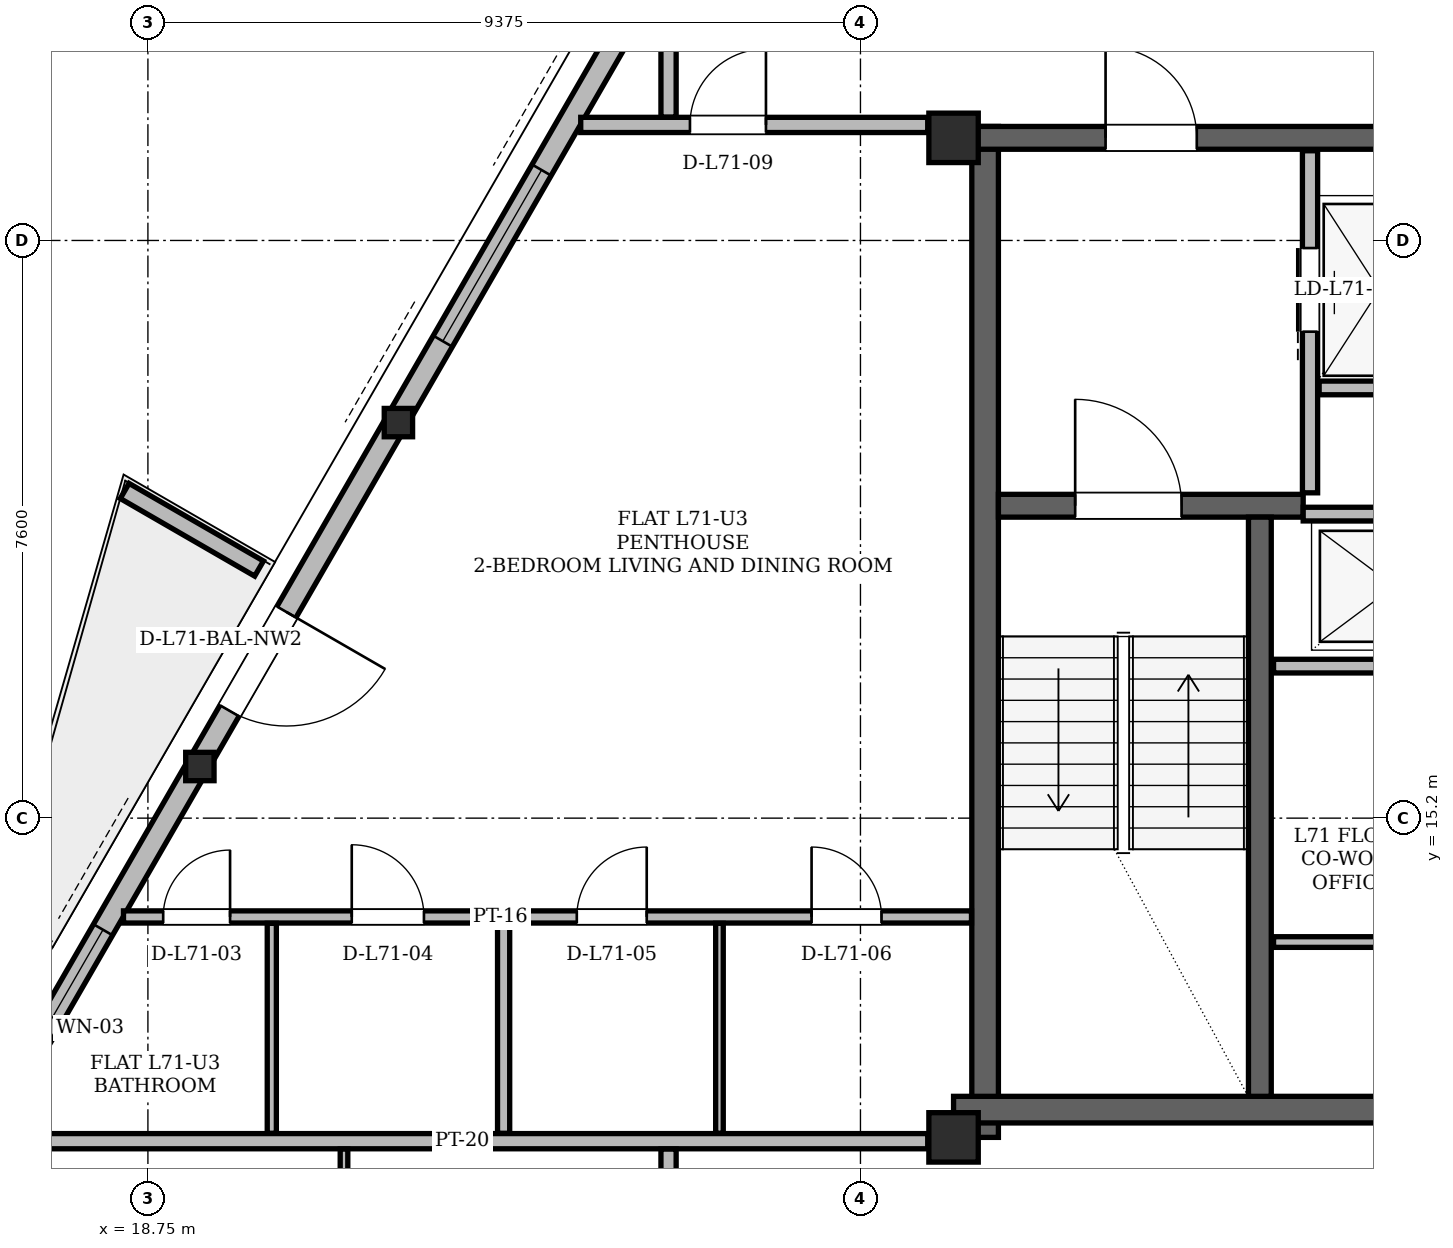
"""IFC4 building model, lengths in metres.
Left out: names, types, materials, properties, quantities, classifications, styles, units other than length and angle.
Written with IfcOpenShell. Run it as: python <this file> out.ifc"""

import sys

from ifc_helpers import new_model, si_unit, direction, frame, frame_2d, origin, origin_2d, place, context, subcontext, project, spatial, polyline, rectangle, hollow_rectangle, i_section, outline, extrude, element, fill, save


model = new_model("IFC4")
c1 = context("Model", 3, precision=1e-05, world=origin(), true_north=direction((0.0, 1.0)))
c2 = subcontext(c1, "Body", "Model", "MODEL_VIEW")
j1 = project(units=[si_unit("LENGTHUNIT", "METRE"), si_unit("PLANEANGLEUNIT", "RADIAN")], contexts=[c1])
p1 = place(None, origin())
s1 = spatial("IfcSite", under=j1, at=p1, CompositionType="ELEMENT")
p2 = place(p1, origin())
s2 = spatial("IfcBuilding", under=s1, at=p2, CompositionType="ELEMENT")
p3 = place(p2, frame((0.0, 0.0, 269.4)))
s3 = spatial("IfcBuildingStorey", under=s2, at=p3, CompositionType="ELEMENT", Elevation=269.4)
for number, where, z_axis, x_axis in (
    (1, (29.35, 11.0, 0.0), (0.0, 0.0, 1.0), (1.0, 0.0, 0.0)),
    (2, (29.35, 24.15, 0.0), (0.0, 0.0, 1.0), (1.0, 0.0, 0.0)),
):
    element("IfcColumn", number, at=place(p3, frame(where, z_axis=z_axis, x_axis=x_axis)), inside=s3, PredefinedType="COLUMN", context=c2, shape_type="SweptSolid", body=[
        extrude(hollow_rectangle(XDim=0.65, YDim=0.65, WallThickness=0.05, at=origin_2d()), origin(), (0.0, 0.0, 1.0), 3.9),
    ])
for number, where, z_axis, x_axis in (
    (3, (22.023, 20.423, 0.005), (0.012, -0.01, 1.0), (0.63, 0.776, 0.0)),
    (4, (19.412, 15.901, 0.005), (0.011, -0.011, 1.0), (0.707, 0.707, 0.0)),
):
    element("IfcColumn", number, at=place(p3, frame(where, z_axis=z_axis, x_axis=x_axis)), inside=s3, PredefinedType="COLUMN", context=c2, shape_type="SweptSolid", body=[
        extrude(i_section(OverallWidth=0.373, OverallDepth=0.373, WebThickness=0.016, FlangeThickness=0.026, at=origin_2d()), origin(), (0.0, 0.0, 1.0), 3.891),
    ])
p4 = place(p3, frame((29.765, 11.0, 0.0), z_axis=(0.0, 0.0, 1.0), x_axis=(0.0, 1.0, 0.0)))
e5 = element("IfcWall", 5, at=p4, inside=s3, PredefinedType="SHEAR", context=c2, shape_type="SweptSolid", body=[
    extrude(rectangle(XDim=13.3, YDim=0.35, at=frame_2d((6.65, 0.0))), origin(), (0.0, 0.0, 1.0), 3.68),
])
p5 = place(p3, frame((29.35, 11.365, 0.0), z_axis=(0.0, 0.0, 1.0), x_axis=(1.0, 0.0, 0.0)))
e6 = element("IfcWall", 6, at=p5, inside=s3, PredefinedType="SHEAR", context=c2, shape_type="SweptSolid", body=[
    extrude(rectangle(XDim=7.1, YDim=0.35, at=frame_2d((3.55, 0.0))), origin(), (0.0, 0.0, 1.0), 3.68),
])
p6 = place(p3, frame((29.65, 24.15, 0.0), z_axis=(0.0, 0.0, 1.0), x_axis=(1.0, 0.0, 0.0)))
e7 = element("IfcWall", 7, at=p6, inside=s3, PredefinedType="SHEAR", context=c2, shape_type="SweptSolid", body=[
    extrude(rectangle(XDim=15.7, YDim=0.3, at=frame_2d((7.85, 0.0))), origin(), (0.0, 0.0, 1.0), 3.68),
])
p7 = place(p6, frame((1.7, 0.0, 0.0)))
e8 = element("IfcOpeningElement", 8, at=p7, cuts=e7, PredefinedType="OPENING", context=c2, shape_type="SweptSolid", body=[
    extrude(rectangle(XDim=1.2, YDim=2.2, at=frame_2d((0.6, 1.1))), frame((0.0, 0.15, 0.0), z_axis=(0.0, -1.0, 0.0), x_axis=(1.0, 0.0, 0.0)), (0.0, 0.0, 1.0), 0.3),
])
p8 = place(p6, frame((12.8, 0.0, 0.0)))
e9 = element("IfcOpeningElement", 9, at=p8, cuts=e7, PredefinedType="OPENING", context=c2, shape_type="SweptSolid", body=[
    extrude(rectangle(XDim=1.2, YDim=2.2, at=frame_2d((0.6, 1.1))), frame((0.0, 0.15, 0.0), z_axis=(0.0, -1.0, 0.0), x_axis=(1.0, 0.0, 0.0)), (0.0, 0.0, 1.0), 0.3),
])
p9 = place(p6, frame((7.4, 0.0, 0.0)))
e10 = element("IfcOpeningElement", 10, at=p9, cuts=e7, PredefinedType="OPENING", context=c2, shape_type="SweptSolid", body=[
    extrude(rectangle(XDim=0.9, YDim=2.05, at=frame_2d((0.45, 1.025))), frame((0.0, 0.15, 0.0), z_axis=(0.0, -1.0, 0.0), x_axis=(1.0, 0.0, 0.0)), (0.0, 0.0, 1.0), 0.3),
])
p10 = place(p3, frame((29.94, 19.31, 0.0), z_axis=(0.0, 0.0, 1.0), x_axis=(1.0, 0.0, 0.0)))
e11 = element("IfcWall", 11, at=p10, inside=s3, PredefinedType="SHEAR", context=c2, shape_type="SweptSolid", body=[
    extrude(rectangle(XDim=4.01, YDim=0.3, at=frame_2d((2.005, 0.0))), origin(), (0.0, 0.0, 1.0), 3.68),
])
p11 = place(p10, frame((1.01, 0.0, 0.0)))
e12 = element("IfcOpeningElement", 12, at=p11, cuts=e11, PredefinedType="OPENING", context=c2, shape_type="SweptSolid", body=[
    extrude(rectangle(XDim=1.4, YDim=2.2, at=frame_2d((0.7, 1.1))), frame((0.0, 0.15, 0.0), z_axis=(0.0, -1.0, 0.0), x_axis=(1.0, 0.0, 0.0)), (0.0, 0.0, 1.0), 0.3),
])
p12 = place(p3, frame((33.38, 11.54, 0.0), z_axis=(0.0, 0.0, 1.0), x_axis=(0.0, 1.0, 0.0)))
e13 = element("IfcWall", 13, at=p12, inside=s3, PredefinedType="SHEAR", context=c2, shape_type="SweptSolid", body=[
    extrude(rectangle(XDim=7.62, YDim=0.3, at=frame_2d((3.81, 0.0))), origin(), (0.0, 0.0, 1.0), 3.68),
])
p13 = place(p3, frame((16.428, 10.733, 0.0), z_axis=(0.0, 0.0, 1.0), x_axis=(0.499973841066, -0.866040506125, 0.0)))
e14 = element("IfcWall", 14, at=p13, inside=s3, PredefinedType="SOLIDWALL", context=c2, shape_type="SweptSolid", body=[
    extrude(rectangle(XDim=4.848, YDim=0.29, at=frame_2d((2.424, 0.0))), origin(), (0.0, 0.0, 1.0), 3.058),
])
p14 = place(p3, frame((35.076, 43.032, 0.0), z_axis=(0.0, 0.0, 1.0), x_axis=(-0.500001430823, -0.866024577697, 0.0)))
e15 = element("IfcWall", 15, at=p14, inside=s3, PredefinedType="SOLIDWALL", context=c2, shape_type="SweptSolid", body=[
    extrude(rectangle(XDim=37.296, YDim=0.29, at=frame_2d((18.648, 0.0))), origin(), (0.0, 0.0, 1.0), 3.058),
])
p15 = place(p14, frame((8.244, 0.0, 0.0)))
e16 = element("IfcOpeningElement", 16, at=p15, cuts=e15, PredefinedType="OPENING", context=c2, shape_type="SweptSolid", body=[
    extrude(rectangle(XDim=1.5, YDim=2.2, at=frame_2d((0.75, 1.1))), frame((0.0, 0.145, 0.0), z_axis=(0.0, -1.0, 0.0), x_axis=(1.0, 0.0, 0.0)), (0.0, 0.0, 1.0), 0.29),
])
p16 = place(p14, frame((29.006, 0.0, 0.0)))
e17 = element("IfcOpeningElement", 17, at=p16, cuts=e15, PredefinedType="OPENING", context=c2, shape_type="SweptSolid", body=[
    extrude(rectangle(XDim=1.5, YDim=2.2, at=frame_2d((0.75, 1.1))), frame((0.0, 0.145, 0.0), z_axis=(0.0, -1.0, 0.0), x_axis=(1.0, 0.0, 0.0)), (0.0, 0.0, 1.0), 0.29),
])
p17 = place(p14, frame((22.292, 0.0, 0.85)))
e18 = element("IfcOpeningElement", 18, at=p17, cuts=e15, PredefinedType="OPENING", context=c2, shape_type="SweptSolid", body=[
    extrude(rectangle(XDim=2.6, YDim=1.95, at=frame_2d((1.3, 0.975))), frame((0.0, 0.145, 0.0), z_axis=(0.0, -1.0, 0.0), x_axis=(1.0, 0.0, 0.0)), (0.0, 0.0, 1.0), 0.29),
])
p18 = place(p14, frame((33.833, 0.0, 0.85)))
e19 = element("IfcOpeningElement", 19, at=p18, cuts=e15, PredefinedType="OPENING", context=c2, shape_type="SweptSolid", body=[
    extrude(rectangle(XDim=2.4, YDim=1.9, at=frame_2d((1.2, 0.95))), frame((0.0, 0.145, 0.0), z_axis=(0.0, -1.0, 0.0), x_axis=(1.0, 0.0, 0.0)), (0.0, 0.0, 1.0), 0.29),
])
p19 = place(p14, frame((12.154, 0.0, 0.85)))
e20 = element("IfcOpeningElement", 20, at=p19, cuts=e15, PredefinedType="OPENING", context=c2, shape_type="SweptSolid", body=[
    extrude(rectangle(XDim=1.2, YDim=1.48, at=frame_2d((0.6, 0.74))), frame((0.0, 0.145, 0.0), z_axis=(0.0, -1.0, 0.0), x_axis=(1.0, 0.0, 0.0)), (0.0, 0.0, 1.0), 0.29),
])
p20 = place(p14, frame((16.612, 0.0, 0.85)))
e21 = element("IfcOpeningElement", 21, at=p20, cuts=e15, PredefinedType="OPENING", context=c2, shape_type="SweptSolid", body=[
    extrude(rectangle(XDim=1.6, YDim=1.7, at=frame_2d((0.8, 0.85))), frame((0.0, 0.145, 0.0), z_axis=(0.0, -1.0, 0.0), x_axis=(1.0, 0.0, 0.0)), (0.0, 0.0, 1.0), 0.29),
])
p21 = place(p14, frame((2.665, 0.0, 0.85)))
e22 = element("IfcOpeningElement", 22, at=p21, cuts=e15, PredefinedType="OPENING", context=c2, shape_type="SweptSolid", body=[
    extrude(rectangle(XDim=2.0, YDim=1.8, at=frame_2d((1.0, 0.9))), frame((0.0, 0.145, 0.0), z_axis=(0.0, -1.0, 0.0), x_axis=(1.0, 0.0, 0.0)), (0.0, 0.0, 1.0), 0.29),
])
p22 = place(p3, frame((20.212, 18.484, 0.0), z_axis=(0.0, 0.0, 1.0), x_axis=(-0.866012356593, 0.500022597718, 0.0)))
e23 = element("IfcWall", 23, at=p22, inside=s3, PredefinedType="PARAPET", context=c2, shape_type="SweptSolid", body=[
    extrude(outline(polyline([(0.0, 0.0), (2.042, 0.0), (2.042, 1.1), (0.0, 1.32), (0.0, 0.0)])), frame((0.0, 0.115, 0.0), z_axis=(0.0, -1.0, 0.0), x_axis=(1.0, 0.0, 0.0)), (0.0, 0.0, 1.0), 0.23),
])
p23 = place(p3, frame((34.04, 19.48, 0.0), z_axis=(0.0, 0.0, 1.0), x_axis=(0.0, 1.0, 0.0)))
e24 = element("IfcWall", 24, at=p23, inside=s3, PredefinedType="PARTITIONING", context=c2, shape_type="SweptSolid", body=[
    extrude(rectangle(XDim=4.5, YDim=0.2, at=frame_2d((2.25, 0.0))), origin(), (0.0, 0.0, 1.0), 3.68),
])
p24 = place(p23, frame((2.12, 0.0, 0.0)))
e25 = element("IfcOpeningElement", 25, at=p24, cuts=e24, PredefinedType="OPENING", context=c2, shape_type="SweptSolid", body=[
    extrude(rectangle(XDim=1.1, YDim=2.2, at=frame_2d((0.55, 1.1))), frame((0.0, 0.1, 0.0), z_axis=(0.0, -1.0, 0.0), x_axis=(1.0, 0.0, 0.0)), (0.0, 0.0, 1.0), 0.2),
])
p25 = place(p3, frame((34.16, 20.86, 0.0), z_axis=(0.0, 0.0, 1.0), x_axis=(1.0, 0.0, 0.0)))
e26 = element("IfcWall", 26, at=p25, inside=s3, PredefinedType="PARTITIONING", context=c2, shape_type="SweptSolid", body=[
    extrude(rectangle(XDim=1.58, YDim=0.18, at=frame_2d((0.79, 0.0))), origin(), (0.0, 0.0, 1.0), 3.68),
])
p26 = place(p3, frame((33.95, 19.2, 0.0), z_axis=(0.0, 0.0, 1.0), x_axis=(1.0, 0.0, 0.0)))
e27 = element("IfcWall", 27, at=p26, inside=s3, PredefinedType="PARTITIONING", context=c2, shape_type="SweptSolid", body=[
    extrude(rectangle(XDim=2.27, YDim=0.18, at=frame_2d((1.135, 0.0))), origin(), (0.0, 0.0, 1.0), 3.68),
])
p27 = place(p3, frame((33.56, 17.2, 0.0), z_axis=(0.0, 0.0, 1.0), x_axis=(1.0, 0.0, 0.0)))
e28 = element("IfcWall", 28, at=p27, inside=s3, PredefinedType="PARTITIONING", context=c2, shape_type="SweptSolid", body=[
    extrude(rectangle(XDim=2.66, YDim=0.18, at=frame_2d((1.33, 0.0))), origin(), (0.0, 0.0, 1.0), 3.68),
])
p28 = place(p3, frame((33.56, 13.57, 0.0), z_axis=(0.0, 0.0, 1.0), x_axis=(1.0, 0.0, 0.0)))
e29 = element("IfcWall", 29, at=p28, inside=s3, PredefinedType="PARTITIONING", context=c2, shape_type="SweptSolid", body=[
    extrude(rectangle(XDim=2.66, YDim=0.14, at=frame_2d((1.33, 0.0))), origin(), (0.0, 0.0, 1.0), 3.68),
])
p29 = place(p3, frame((16.763, 10.95, 0.0), z_axis=(0.0, 0.0, 1.0), x_axis=(1.0, 0.0, 0.0)))
e30 = element("IfcWall", 30, at=p29, inside=s3, PredefinedType="PARTITIONING", context=c2, shape_type="SweptSolid", body=[
    extrude(rectangle(XDim=12.247, YDim=0.2, at=frame_2d((6.124, 0.0))), origin(), (0.0, 0.0, 1.0), 3.266),
])
p30 = place(p3, frame((18.429, 13.9, 0.0), z_axis=(0.0, 0.0, 1.0), x_axis=(1.0, 0.0, 0.0)))
e31 = element("IfcWall", 31, at=p30, inside=s3, PredefinedType="PARTITIONING", context=c2, shape_type="SweptSolid", body=[
    extrude(rectangle(XDim=11.157, YDim=0.16, at=frame_2d((5.579, 0.0))), origin(), (0.0, 0.0, 1.0), 2.82),
])
p31 = place(p30, frame((0.522, 0.0, 0.0)))
e32 = element("IfcOpeningElement", 32, at=p31, cuts=e31, PredefinedType="OPENING", context=c2, shape_type="SweptSolid", body=[
    extrude(rectangle(XDim=0.88, YDim=2.08, at=frame_2d((0.44, 1.04))), frame((0.0, 0.08, 0.0), z_axis=(0.0, -1.0, 0.0), x_axis=(1.0, 0.0, 0.0)), (0.0, 0.0, 1.0), 0.16),
])
p32 = place(p30, frame((3.003, 0.0, 0.0)))
e33 = element("IfcOpeningElement", 33, at=p32, cuts=e31, PredefinedType="OPENING", context=c2, shape_type="SweptSolid", body=[
    extrude(rectangle(XDim=0.95, YDim=2.1, at=frame_2d((0.475, 1.05))), frame((0.0, 0.08, 0.0), z_axis=(0.0, -1.0, 0.0), x_axis=(1.0, 0.0, 0.0)), (0.0, 0.0, 1.0), 0.16),
])
p33 = place(p30, frame((5.964, 0.0, 0.0)))
e34 = element("IfcOpeningElement", 34, at=p33, cuts=e31, PredefinedType="OPENING", context=c2, shape_type="SweptSolid", body=[
    extrude(rectangle(XDim=0.92, YDim=2.12, at=frame_2d((0.46, 1.06))), frame((0.0, 0.08, 0.0), z_axis=(0.0, -1.0, 0.0), x_axis=(1.0, 0.0, 0.0)), (0.0, 0.0, 1.0), 0.16),
])
p34 = place(p30, frame((9.053, 0.0, 0.0)))
e35 = element("IfcOpeningElement", 35, at=p34, cuts=e31, PredefinedType="OPENING", context=c2, shape_type="SweptSolid", body=[
    extrude(rectangle(XDim=0.92, YDim=2.12, at=frame_2d((0.46, 1.06))), frame((0.0, 0.08, 0.0), z_axis=(0.0, -1.0, 0.0), x_axis=(1.0, 0.0, 0.0)), (0.0, 0.0, 1.0), 0.16),
])
p35 = place(p3, frame((24.445, 24.32, 0.0), z_axis=(0.0, 0.0, 1.0), x_axis=(1.0, 0.0, 0.0)))
e36 = element("IfcWall", 36, at=p35, inside=s3, PredefinedType="PARTITIONING", context=c2, shape_type="SweptSolid", body=[
    extrude(rectangle(XDim=4.565, YDim=0.2, at=frame_2d((2.283, 0.0))), origin(), (0.0, 0.0, 1.0), 3.68),
])
p36 = place(p35, frame((1.437, 0.0, 0.0)))
e37 = element("IfcOpeningElement", 37, at=p36, cuts=e36, PredefinedType="OPENING", context=c2, shape_type="SweptSolid", body=[
    extrude(rectangle(XDim=1.0, YDim=2.18, at=frame_2d((0.5, 1.09))), frame((0.0, 0.1, 0.0), z_axis=(0.0, -1.0, 0.0), x_axis=(1.0, 0.0, 0.0)), (0.0, 0.0, 1.0), 0.2),
])
p37 = place(p3, frame((20.38, 11.054, 0.0), z_axis=(0.0, 0.0, 1.0), x_axis=(0.0, 1.0, 0.0)))
e38 = element("IfcWall", 38, at=p37, inside=s3, PredefinedType="PARTITIONING", context=c2, shape_type="SweptSolid", body=[
    extrude(rectangle(XDim=2.762, YDim=0.12, at=frame_2d((1.381, 0.0))), origin(), (0.0, 0.0, 1.0), 3.68),
])
p38 = place(p3, frame((21.33, 6.684, 0.0), z_axis=(0.0, 0.0, 1.0), x_axis=(0.0, 1.0, 0.0)))
e39 = element("IfcWall", 39, at=p38, inside=s3, PredefinedType="PARTITIONING", context=c2, shape_type="SweptSolid", body=[
    extrude(rectangle(XDim=4.162, YDim=0.1, at=frame_2d((2.081, 0.0))), origin(), (0.0, 0.0, 1.0), 3.68),
])
p39 = place(p38, frame((1.694, 0.0, 0.0)))
e40 = element("IfcOpeningElement", 40, at=p39, cuts=e39, PredefinedType="OPENING", context=c2, shape_type="SweptSolid", body=[
    extrude(rectangle(XDim=0.88, YDim=2.08, at=frame_2d((0.44, 1.04))), frame((0.0, 0.05, 0.0), z_axis=(0.0, -1.0, 0.0), x_axis=(1.0, 0.0, 0.0)), (0.0, 0.0, 1.0), 0.1),
])
p40 = place(p3, frame((23.43, 11.054, 0.0), z_axis=(0.0, 0.0, 1.0), x_axis=(0.0, 1.0, 0.0)))
e41 = element("IfcWall", 41, at=p40, inside=s3, PredefinedType="PARTITIONING", context=c2, shape_type="SweptSolid", body=[
    extrude(rectangle(XDim=2.762, YDim=0.16, at=frame_2d((1.381, 0.0))), origin(), (0.0, 0.0, 1.0), 3.68),
])
for number, where, z_axis, x_axis in (
    (42, (25.6, 9.404, 0.0), (0.0, 0.0, 1.0), (0.0, 1.0, 0.0)),
    (43, (25.6, 24.424, 0.0), (0.0, 0.0, 1.0), (0.0, 1.0, 0.0)),
):
    element("IfcWall", number, at=place(p3, frame(where, z_axis=z_axis, x_axis=x_axis)), inside=s3, PredefinedType="PARTITIONING", context=c2, shape_type="SweptSolid", body=[
        extrude(rectangle(XDim=1.442, YDim=0.2, at=frame_2d((0.721, 0.0))), origin(), (0.0, 0.0, 1.0), 3.68),
    ])
p41 = place(p3, frame((26.27, 11.054, 0.0), z_axis=(0.0, 0.0, 1.0), x_axis=(0.0, 1.0, 0.0)))
e44 = element("IfcWall", 44, at=p41, inside=s3, PredefinedType="PARTITIONING", context=c2, shape_type="SweptSolid", body=[
    extrude(rectangle(XDim=2.762, YDim=0.1, at=frame_2d((1.381, 0.0))), origin(), (0.0, 0.0, 1.0), 3.68),
])
p42 = place(p16, origin())
e45 = element("IfcDoor", 45, at=p42, inside=s3, OperationType="SINGLE_SWING_LEFT", PredefinedType="DOOR", context=c2, shape_type="SweptSolid", body=[
    extrude(rectangle(XDim=1.5, YDim=2.2, at=frame_2d((0.75, 1.1))), frame((0.0, 0.025, 0.0), z_axis=(0.0, -1.0, 0.0), x_axis=(1.0, 0.0, 0.0)), (0.0, 0.0, 1.0), 0.05),
])
fill(e17, e45)
p43 = place(p17, origin())
e46 = element("IfcWindow", 46, at=p43, inside=s3, PartitioningType="SINGLE_PANEL", PredefinedType="WINDOW", context=c2, shape_type="SweptSolid", body=[
    extrude(rectangle(XDim=2.6, YDim=1.95, at=frame_2d((1.3, 0.975))), frame((0.0, 0.03, 0.0), z_axis=(0.0, -1.0, 0.0), x_axis=(1.0, 0.0, 0.0)), (0.0, 0.0, 1.0), 0.06),
])
fill(e18, e46)
p44 = place(p18, origin())
e47 = element("IfcWindow", 47, at=p44, inside=s3, PartitioningType="SINGLE_PANEL", PredefinedType="WINDOW", context=c2, shape_type="SweptSolid", body=[
    extrude(rectangle(XDim=2.4, YDim=1.9, at=frame_2d((1.2, 0.95))), frame((0.0, 0.03, 0.0), z_axis=(0.0, -1.0, 0.0), x_axis=(1.0, 0.0, 0.0)), (0.0, 0.0, 1.0), 0.06),
])
fill(e19, e47)
p45 = place(p24, origin())
e48 = element("IfcDoor", 48, at=p45, inside=s3, OperationType="SLIDING_TO_LEFT", PredefinedType="DOOR", context=c2, shape_type="SweptSolid", body=[
    extrude(rectangle(XDim=1.1, YDim=2.2, at=frame_2d((0.55, 1.1))), frame((0.0, 0.025, 0.0), z_axis=(0.0, -1.0, 0.0), x_axis=(1.0, 0.0, 0.0)), (0.0, 0.0, 1.0), 0.05),
])
fill(e25, e48)
p46 = place(p11, origin())
e49 = element("IfcDoor", 49, at=p46, inside=s3, OperationType="SINGLE_SWING_LEFT", PredefinedType="DOOR", context=c2, shape_type="SweptSolid", body=[
    extrude(rectangle(XDim=1.4, YDim=2.2, at=frame_2d((0.7, 1.1))), frame((0.0, 0.025, 0.0), z_axis=(0.0, -1.0, 0.0), x_axis=(1.0, 0.0, 0.0)), (0.0, 0.0, 1.0), 0.05),
])
fill(e12, e49)
p47 = place(p7, origin())
e50 = element("IfcDoor", 50, at=p47, inside=s3, OperationType="SINGLE_SWING_LEFT", PredefinedType="DOOR", context=c2, shape_type="SweptSolid", body=[
    extrude(rectangle(XDim=1.2, YDim=2.2, at=frame_2d((0.6, 1.1))), frame((0.0, 0.025, 0.0), z_axis=(0.0, -1.0, 0.0), x_axis=(1.0, 0.0, 0.0)), (0.0, 0.0, 1.0), 0.05),
])
fill(e8, e50)
p48 = place(p31, origin())
e51 = element("IfcDoor", 51, at=p48, inside=s3, OperationType="SINGLE_SWING_RIGHT", PredefinedType="DOOR", context=c2, shape_type="SweptSolid", body=[
    extrude(rectangle(XDim=0.88, YDim=2.08, at=frame_2d((0.44, 1.04))), frame((0.0, 0.025, 0.0), z_axis=(0.0, -1.0, 0.0), x_axis=(1.0, 0.0, 0.0)), (0.0, 0.0, 1.0), 0.05),
])
fill(e32, e51)
p49 = place(p32, origin())
e52 = element("IfcDoor", 52, at=p49, inside=s3, OperationType="SINGLE_SWING_LEFT", PredefinedType="DOOR", context=c2, shape_type="SweptSolid", body=[
    extrude(rectangle(XDim=0.95, YDim=2.1, at=frame_2d((0.475, 1.05))), frame((0.0, 0.025, 0.0), z_axis=(0.0, -1.0, 0.0), x_axis=(1.0, 0.0, 0.0)), (0.0, 0.0, 1.0), 0.05),
])
fill(e33, e52)
p50 = place(p33, origin())
e53 = element("IfcDoor", 53, at=p50, inside=s3, OperationType="SINGLE_SWING_RIGHT", PredefinedType="DOOR", context=c2, shape_type="SweptSolid", body=[
    extrude(rectangle(XDim=0.92, YDim=2.12, at=frame_2d((0.46, 1.06))), frame((0.0, 0.025, 0.0), z_axis=(0.0, -1.0, 0.0), x_axis=(1.0, 0.0, 0.0)), (0.0, 0.0, 1.0), 0.05),
])
fill(e34, e53)
p51 = place(p34, origin())
e54 = element("IfcDoor", 54, at=p51, inside=s3, OperationType="SINGLE_SWING_LEFT", PredefinedType="DOOR", context=c2, shape_type="SweptSolid", body=[
    extrude(rectangle(XDim=0.92, YDim=2.12, at=frame_2d((0.46, 1.06))), frame((0.0, 0.025, 0.0), z_axis=(0.0, -1.0, 0.0), x_axis=(1.0, 0.0, 0.0)), (0.0, 0.0, 1.0), 0.05),
])
fill(e35, e54)
p52 = place(p36, origin())
e55 = element("IfcDoor", 55, at=p52, inside=s3, OperationType="SINGLE_SWING_RIGHT", PredefinedType="DOOR", context=c2, shape_type="SweptSolid", body=[
    extrude(rectangle(XDim=1.0, YDim=2.18, at=frame_2d((0.5, 1.09))), frame((0.0, 0.025, 0.0), z_axis=(0.0, -1.0, 0.0), x_axis=(1.0, 0.0, 0.0)), (0.0, 0.0, 1.0), 0.05),
])
fill(e37, e55)
save(model, sys.argv[1])
